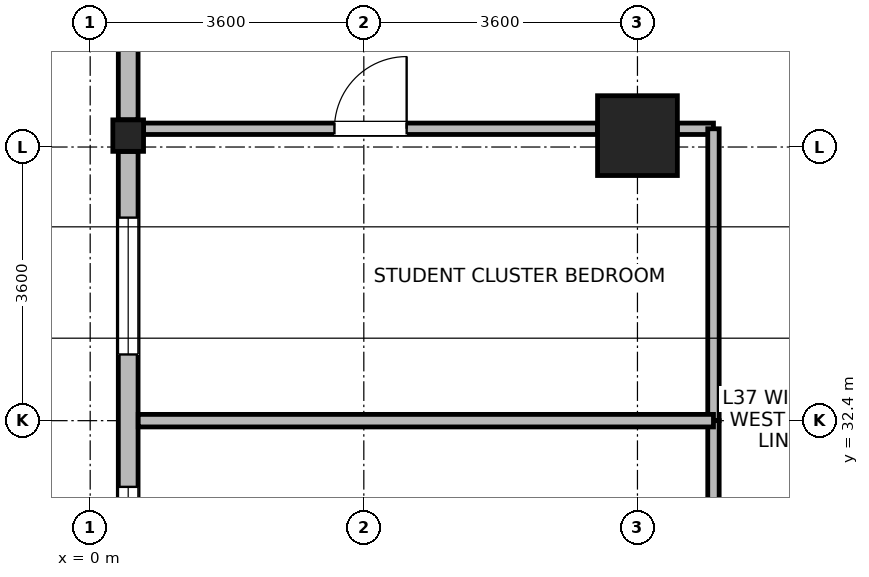
"""IFC4 building model, lengths in metres.
Left out: names, types, materials, properties, quantities, classifications, styles, units other than length and angle.
Written with IfcOpenShell. Run it as: python <this file> out.ifc"""

import sys

from ifc_helpers import new_model, si_unit, direction, frame, frame_2d, origin, origin_2d, place, context, subcontext, project, spatial, rectangle, i_section, extrude, source, transform, mapped, element, fill, save


model = new_model("IFC4")
c1 = context("Model", 3, precision=1e-05, world=origin(), true_north=direction((0.0, 1.0)))
c2 = subcontext(c1, "Body", "Model", "MODEL_VIEW")
j1 = project(units=[si_unit("LENGTHUNIT", "METRE"), si_unit("PLANEANGLEUNIT", "RADIAN")], contexts=[c1])
p1 = place(None, origin())
s1 = spatial("IfcSite", under=j1, at=p1, CompositionType="ELEMENT")
p2 = place(p1, origin())
s2 = spatial("IfcBuilding", under=s1, at=p2, CompositionType="ELEMENT")
p3 = place(p2, frame((0.0, 0.0, 147.6)))
s3 = spatial("IfcBuildingStorey", under=s2, at=p3, CompositionType="ELEMENT", Elevation=147.6)
m1 = source(origin(), c2, "Body", "SweptSolid", [
    extrude(rectangle(XDim=1.05, YDim=1.05, at=origin_2d()), origin(), (0.0, 0.0, 1.0), 3.7),
])
p4 = place(p3, frame((7.2, 36.15, 0.0), z_axis=(0.0, 0.0, 1.0), x_axis=(1.0, 0.0, 0.0)))
e1 = element("IfcColumn", 1, at=p4, inside=s3, PredefinedType="COLUMN", context=c2, shape_type="MappedRepresentation", body=[
    mapped(m1, transform((0.0, 0.0, 0.0), x_axis=(1.0, 0.0, 0.0), y_axis=(0.0, 1.0, 0.0), z_axis=(0.0, 0.0, 1.0), scale=1.0)),
])
m2 = source(origin(), c2, "Body", "SweptSolid", [
    extrude(i_section(OverallWidth=0.404, OverallDepth=0.414, WebThickness=0.021, FlangeThickness=0.028, FilletRadius=0.015, at=origin_2d()), origin(), (0.0, 0.0, 1.0), 3.7),
])
p5 = place(p3, frame((0.5, 36.15, 0.0), z_axis=(0.0, 0.0, 1.0), x_axis=(1.0, 0.0, 0.0)))
e2 = element("IfcColumn", 2, at=p5, inside=s3, PredefinedType="COLUMN", context=c2, shape_type="MappedRepresentation", body=[
    mapped(m2, transform((0.0, 0.0, 0.0), x_axis=(1.0, 0.0, 0.0), y_axis=(0.0, 1.0, 0.0), z_axis=(0.0, 0.0, 1.0), scale=1.0)),
])
p6 = place(p3, frame((0.5, 36.358, 0.0), z_axis=(0.0, 0.0, 1.0), x_axis=(0.0, 1.0, 0.0)))
e3 = element("IfcWall", 3, at=p6, inside=s3, PredefinedType="STANDARD", context=c2, shape_type="SweptSolid", body=[
    extrude(rectangle(XDim=6.972, YDim=0.26, at=frame_2d((3.486, 0.0))), origin(), (0.0, 0.0, 1.0), 3.44),
])
p7 = place(p6, frame((4.329, 0.0, 0.85)))
e4 = element("IfcOpeningElement", 4, at=p7, cuts=e3, PredefinedType="OPENING", context=c2, shape_type="SweptSolid", body=[
    extrude(rectangle(XDim=1.8, YDim=1.85, at=frame_2d((0.9, 0.925))), frame((0.0, 0.14, 0.0), z_axis=(0.0, -1.0, 0.0), x_axis=(1.0, 0.0, 0.0)), (0.0, 0.0, 1.0), 0.28),
])
p8 = place(p6, frame((3.011, 0.0, 0.85)))
e5 = element("IfcOpeningElement", 5, at=p8, cuts=e3, PredefinedType="OPENING", context=c2, shape_type="SweptSolid", body=[
    extrude(rectangle(XDim=0.95, YDim=1.75, at=frame_2d((0.475, 0.875))), frame((0.0, 0.14, 0.0), z_axis=(0.0, -1.0, 0.0), x_axis=(1.0, 0.0, 0.0)), (0.0, 0.0, 1.0), 0.28),
])
p9 = place(p3, frame((0.5, 28.858, 0.0), z_axis=(0.0, 0.0, 1.0), x_axis=(0.0, 1.0, 0.0)))
e6 = element("IfcWall", 6, at=p9, inside=s3, PredefinedType="STANDARD", context=c2, shape_type="SweptSolid", body=[
    extrude(rectangle(XDim=7.084, YDim=0.26, at=frame_2d((3.542, 0.0))), origin(), (0.0, 0.0, 1.0), 2.99),
])
p10 = place(p9, frame((0.871, 0.0, 0.85)))
e7 = element("IfcOpeningElement", 7, at=p10, cuts=e6, PredefinedType="OPENING", context=c2, shape_type="SweptSolid", body=[
    extrude(rectangle(XDim=1.8, YDim=1.85, at=frame_2d((0.9, 0.925))), frame((0.0, 0.14, 0.0), z_axis=(0.0, -1.0, 0.0), x_axis=(1.0, 0.0, 0.0)), (0.0, 0.0, 1.0), 0.28),
])
p11 = place(p9, frame((4.413, 0.0, 0.85)))
e8 = element("IfcOpeningElement", 8, at=p11, cuts=e6, PredefinedType="OPENING", context=c2, shape_type="SweptSolid", body=[
    extrude(rectangle(XDim=1.8, YDim=1.85, at=frame_2d((0.9, 0.925))), frame((0.0, 0.14, 0.0), z_axis=(0.0, -1.0, 0.0), x_axis=(1.0, 0.0, 0.0)), (0.0, 0.0, 1.0), 0.28),
])
p12 = place(p3, frame((0.702, 36.24, 0.0), z_axis=(0.0, 0.0, 1.0), x_axis=(1.0, 0.0, 0.0)))
e9 = element("IfcWall", 9, at=p12, inside=s3, PredefinedType="PARTITIONING", context=c2, shape_type="SweptSolid", body=[
    extrude(rectangle(XDim=5.973, YDim=0.15, at=frame_2d((2.987, 0.0))), origin(), (0.0, 0.0, 1.0), 2.84),
])
p13 = place(p12, frame((2.511, 0.0, 0.0)))
e10 = element("IfcOpeningElement", 10, at=p13, cuts=e9, PredefinedType="OPENING", context=c2, shape_type="SweptSolid", body=[
    extrude(rectangle(XDim=0.95, YDim=2.1, at=frame_2d((0.475, 1.05))), frame((0.0, 0.085, 0.0), z_axis=(0.0, -1.0, 0.0), x_axis=(1.0, 0.0, 0.0)), (0.0, 0.0, 1.0), 0.17),
])
p14 = place(p3, frame((7.725, 36.24, 0.0), z_axis=(0.0, 0.0, 1.0), x_axis=(1.0, 0.0, 0.0)))
e11 = element("IfcWall", 11, at=p14, inside=s3, PredefinedType="PARTITIONING", context=c2, shape_type="SweptSolid", body=[
    extrude(rectangle(XDim=0.475, YDim=0.15, at=frame_2d((0.237, 0.0))), origin(), (0.0, 0.0, 1.0), 2.84),
])
p15 = place(p3, frame((8.2, 32.4, 0.0), z_axis=(0.0, 0.0, 1.0), x_axis=(0.0, 1.0, 0.0)))
e12 = element("IfcWall", 12, at=p15, inside=s3, PredefinedType="PARTITIONING", context=c2, shape_type="SweptSolid", body=[
    extrude(rectangle(XDim=3.84, YDim=0.15, at=frame_2d((1.92, 0.0))), origin(), (0.0, 0.0, 1.0), 3.44),
])
p16 = place(p3, frame((8.2, 28.56, 0.0), z_axis=(0.0, 0.0, 1.0), x_axis=(0.0, 1.0, 0.0)))
e13 = element("IfcWall", 13, at=p16, inside=s3, PredefinedType="PARTITIONING", context=c2, shape_type="SweptSolid", body=[
    extrude(rectangle(XDim=3.84, YDim=0.15, at=frame_2d((1.92, 0.0))), origin(), (0.0, 0.0, 1.0), 3.44),
])
p17 = place(p3, frame((0.632, 32.4, 0.0), z_axis=(0.0, 0.0, 1.0), x_axis=(1.0, 0.0, 0.0)))
e14 = element("IfcWall", 14, at=p17, inside=s3, PredefinedType="PARTITIONING", context=c2, shape_type="SweptSolid", body=[
    extrude(rectangle(XDim=7.568, YDim=0.165, at=frame_2d((3.784, 0.0))), origin(), (0.0, 0.0, 1.0), 3.44),
])
p18 = place(p10, origin())
e15 = element("IfcWindow", 15, at=p18, inside=s3, PartitioningType="SINGLE_PANEL", PredefinedType="WINDOW", context=c2, shape_type="SweptSolid", body=[
    extrude(rectangle(XDim=1.8, YDim=1.85, at=frame_2d((0.9, 0.925))), frame((0.0, 0.03, 0.0), z_axis=(0.0, -1.0, 0.0), x_axis=(1.0, 0.0, 0.0)), (0.0, 0.0, 1.0), 0.06),
])
fill(e7, e15)
p19 = place(p11, origin())
e16 = element("IfcWindow", 16, at=p19, inside=s3, PartitioningType="SINGLE_PANEL", PredefinedType="WINDOW", context=c2, shape_type="SweptSolid", body=[
    extrude(rectangle(XDim=1.8, YDim=1.85, at=frame_2d((0.9, 0.925))), frame((0.0, 0.03, 0.0), z_axis=(0.0, -1.0, 0.0), x_axis=(1.0, 0.0, 0.0)), (0.0, 0.0, 1.0), 0.06),
])
fill(e8, e16)
p20 = place(p13, origin())
e17 = element("IfcDoor", 17, at=p20, inside=s3, OperationType="SINGLE_SWING_RIGHT", PredefinedType="DOOR", context=c2, shape_type="SweptSolid", body=[
    extrude(rectangle(XDim=0.95, YDim=2.1, at=frame_2d((0.475, 1.05))), frame((0.0, 0.025, 0.0), z_axis=(0.0, -1.0, 0.0), x_axis=(1.0, 0.0, 0.0)), (0.0, 0.0, 1.0), 0.05),
])
fill(e10, e17)
save(model, sys.argv[1])
